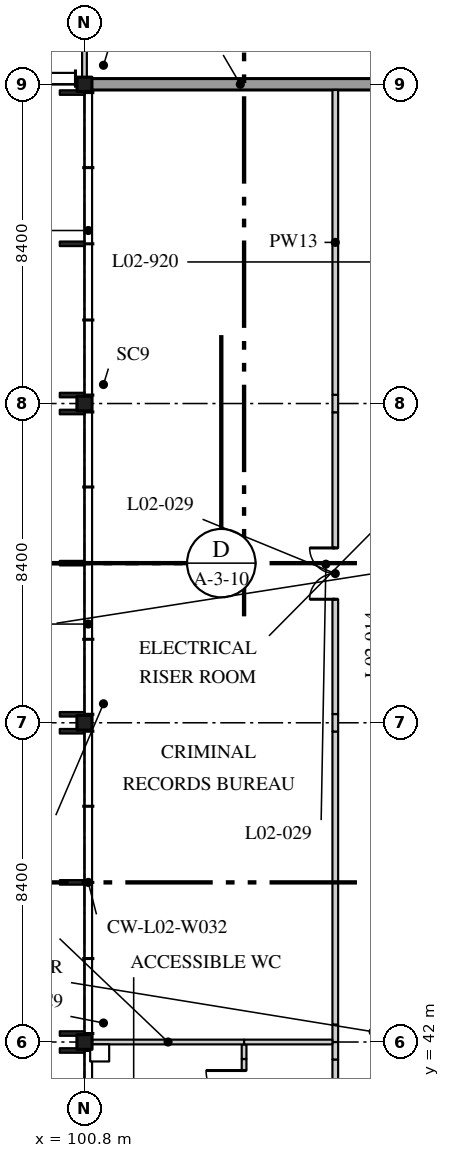
"""IFC4 building model, lengths in metres.
Left out: names, types, materials, properties, quantities, classifications, styles, units other than length and angle.
Written with IfcOpenShell. Run it as: python <this file> out.ifc"""

import sys

from ifc_helpers import new_model, si_unit, direction, frame, frame_2d, origin, origin_2d, place, context, subcontext, project, spatial, rectangle, i_section, extrude, element, fill, save


model = new_model("IFC4")
c1 = context("Model", 3, precision=1e-05, world=origin(), true_north=direction((0.0, 1.0)))
c2 = subcontext(c1, "Body", "Model", "MODEL_VIEW")
j1 = project(units=[si_unit("LENGTHUNIT", "METRE"), si_unit("PLANEANGLEUNIT", "RADIAN")], contexts=[c1])
p1 = place(None, origin())
s1 = spatial("IfcSite", under=j1, at=p1, CompositionType="ELEMENT")
p2 = place(p1, origin())
s2 = spatial("IfcBuilding", under=s1, at=p2, CompositionType="ELEMENT")
p3 = place(p2, frame((0.0, 0.0, 9.9)))
s3 = spatial("IfcBuildingStorey", under=s2, at=p3, CompositionType="ELEMENT", Elevation=9.9)
for number, where, z_axis, x_axis in (
    (1, (100.8, 42.0, 0.0), (0.0, 0.0, 1.0), (1.0, 0.0, 0.0)),
    (2, (100.8, 50.4, 0.0), (0.0, 0.0, 1.0), (1.0, 0.0, 0.0)),
    (3, (100.8, 58.8, 0.0), (0.0, 0.0, 1.0), (1.0, 0.0, 0.0)),
):
    element("IfcColumn", number, at=place(p3, frame(where, z_axis=z_axis, x_axis=x_axis)), inside=s3, PredefinedType="COLUMN", context=c2, shape_type="SweptSolid", body=[
        extrude(i_section(OverallWidth=0.399, OverallDepth=0.386, WebThickness=0.021, FlangeThickness=0.033, FilletRadius=0.015, at=origin_2d()), origin(), (0.0, 0.0, 1.0), 4.37),
    ])
p4 = place(p3, frame((100.8, 67.2, 0.0), z_axis=(0.0, 0.0, 1.0), x_axis=(1.0, 0.0, 0.0)))
e4 = element("IfcColumn", 4, at=p4, inside=s3, PredefinedType="COLUMN", context=c2, shape_type="SweptSolid", body=[
    extrude(i_section(OverallWidth=0.394, OverallDepth=0.376, WebThickness=0.017, FlangeThickness=0.028, FilletRadius=0.015, at=origin_2d()), origin(), (0.0, 0.0, 1.0), 4.37),
])
p5 = place(p3, frame((107.4, 33.75, 0.0), z_axis=(0.0, 0.0, 1.0), x_axis=(0.0, 1.0, 0.0)))
e5 = element("IfcWall", 5, at=p5, inside=s3, PredefinedType="PARTITIONING", context=c2, shape_type="SweptSolid", body=[
    extrude(rectangle(XDim=7.79, YDim=0.15, at=frame_2d((3.895, 0.0))), origin(), (0.0, 0.0, 1.0), 4.37),
])
p6 = place(p5, frame((2.4, 0.0, 0.0)))
e6 = element("IfcOpeningElement", 6, at=p6, cuts=e5, PredefinedType="OPENING", context=c2, shape_type="SweptSolid", body=[
    extrude(rectangle(XDim=0.9, YDim=2.1, at=frame_2d((0.45, 1.05))), frame((0.0, 0.085, 0.0), z_axis=(0.0, -1.0, 0.0), x_axis=(1.0, 0.0, 0.0)), (0.0, 0.0, 1.0), 0.17),
])
for number, where, z_axis, x_axis in (
    (7, (107.4, 41.54, 0.0), (0.0, 0.0, 1.0), (0.0, 1.0, 0.0)),
    (8, (107.4, 42.0, 0.0), (0.0, 0.0, 1.0), (0.0, 1.0, 0.0)),
):
    element("IfcWall", number, at=place(p3, frame(where, z_axis=z_axis, x_axis=x_axis)), inside=s3, PredefinedType="PARTITIONING", context=c2, shape_type="SweptSolid", body=[
        extrude(rectangle(XDim=0.46, YDim=0.15, at=frame_2d((0.23, 0.0))), origin(), (0.0, 0.0, 1.0), 3.746),
    ])
p7 = place(p3, frame((107.4, 42.46, 0.0), z_axis=(0.0, 0.0, 1.0), x_axis=(0.0, 1.0, 0.0)))
e9 = element("IfcWall", 9, at=p7, inside=s3, PredefinedType="PARTITIONING", context=c2, shape_type="SweptSolid", body=[
    extrude(rectangle(XDim=7.71, YDim=0.15, at=frame_2d((3.855, 0.0))), origin(), (0.0, 0.0, 1.0), 4.37),
])
p8 = place(p3, frame((107.4, 50.17, 0.0), z_axis=(0.0, 0.0, 1.0), x_axis=(0.0, 1.0, 0.0)))
e10 = element("IfcWall", 10, at=p8, inside=s3, PredefinedType="PARTITIONING", context=c2, shape_type="SweptSolid", body=[
    extrude(rectangle(XDim=0.46, YDim=0.15, at=frame_2d((0.23, 0.0))), origin(), (0.0, 0.0, 1.0), 3.746),
])
p9 = place(p3, frame((107.4, 50.63, 0.0), z_axis=(0.0, 0.0, 1.0), x_axis=(0.0, 1.0, 0.0)))
e11 = element("IfcWall", 11, at=p9, inside=s3, PredefinedType="PARTITIONING", context=c2, shape_type="SweptSolid", body=[
    extrude(rectangle(XDim=7.94, YDim=0.15, at=frame_2d((3.97, 0.0))), origin(), (0.0, 0.0, 1.0), 4.37),
])
p10 = place(p9, frame((3.02, 0.0, 0.0)))
e12 = element("IfcOpeningElement", 12, at=p10, cuts=e11, PredefinedType="OPENING", context=c2, shape_type="SweptSolid", body=[
    extrude(rectangle(XDim=1.35, YDim=2.1, at=frame_2d((0.675, 1.05))), frame((0.0, 0.085, 0.0), z_axis=(0.0, -1.0, 0.0), x_axis=(1.0, 0.0, 0.0)), (0.0, 0.0, 1.0), 0.17),
])
p11 = place(p3, frame((107.4, 58.57, 0.0), z_axis=(0.0, 0.0, 1.0), x_axis=(0.0, 1.0, 0.0)))
e13 = element("IfcWall", 13, at=p11, inside=s3, PredefinedType="PARTITIONING", context=c2, shape_type="SweptSolid", body=[
    extrude(rectangle(XDim=0.46, YDim=0.15, at=frame_2d((0.23, 0.0))), origin(), (0.0, 0.0, 1.0), 3.746),
])
p12 = place(p3, frame((107.4, 59.03, 0.0), z_axis=(0.0, 0.0, 1.0), x_axis=(0.0, 1.0, 0.0)))
e14 = element("IfcWall", 14, at=p12, inside=s3, PredefinedType="PARTITIONING", context=c2, shape_type="SweptSolid", body=[
    extrude(rectangle(XDim=8.02, YDim=0.15, at=frame_2d((4.01, 0.0))), origin(), (0.0, 0.0, 1.0), 4.37),
])
p13 = place(p3, frame((105.0, 39.6, 0.0), z_axis=(0.0, 0.0, 1.0), x_axis=(0.0, 1.0, 0.0)))
e15 = element("IfcWall", 15, at=p13, inside=s3, PredefinedType="PARTITIONING", context=c2, shape_type="SweptSolid", body=[
    extrude(rectangle(XDim=1.953, YDim=0.125, at=frame_2d((0.977, 0.0))), origin(), (0.0, 0.0, 1.0), 4.37),
])
p14 = place(p13, frame((0.65, 0.0, 0.0)))
e16 = element("IfcOpeningElement", 16, at=p14, cuts=e15, PredefinedType="OPENING", context=c2, shape_type="SweptSolid", body=[
    extrude(rectangle(XDim=1.0, YDim=2.1, at=frame_2d((0.5, 1.05))), frame((0.0, 0.073, 0.0), z_axis=(0.0, -1.0, 0.0), x_axis=(1.0, 0.0, 0.0)), (0.0, 0.0, 1.0), 0.145),
])
p15 = place(p3, frame((105.0, 41.553, 0.0), z_axis=(0.0, 0.0, 1.0), x_axis=(0.0, 1.0, 0.0)))
e17 = element("IfcWall", 17, at=p15, inside=s3, PredefinedType="PARTITIONING", context=c2, shape_type="SweptSolid", body=[
    extrude(rectangle(XDim=0.385, YDim=0.125, at=frame_2d((0.192, 0.0))), origin(), (0.0, 0.0, 1.0), 3.746),
])
p16 = place(p3, frame((100.999, 42.0, 0.0), z_axis=(0.0, 0.0, 1.0), x_axis=(1.0, 0.0, 0.0)))
e18 = element("IfcWall", 18, at=p16, inside=s3, PredefinedType="PARTITIONING", context=c2, shape_type="SweptSolid", body=[
    extrude(rectangle(XDim=4.001, YDim=0.125, at=frame_2d((2.0, 0.0))), origin(), (0.0, 0.0, 1.0), 3.746),
])
p17 = place(p3, frame((105.0, 42.0, 0.0), z_axis=(0.0, 0.0, 1.0), x_axis=(1.0, 0.0, 0.0)))
e19 = element("IfcWall", 19, at=p17, inside=s3, PredefinedType="PARTITIONING", context=c2, shape_type="SweptSolid", body=[
    extrude(rectangle(XDim=2.325, YDim=0.125, at=frame_2d((1.163, 0.0))), origin(), (0.0, 0.0, 1.0), 3.746),
])
p18 = place(p3, frame((100.8, 67.388, 0.0), z_axis=(0.0, 0.0, 1.0), x_axis=(0.0, 1.0, 0.0)))
e20 = element("IfcWall", 20, at=p18, inside=s3, PredefinedType="PARTITIONING", context=c2, shape_type="SweptSolid", body=[
    extrude(rectangle(XDim=6.637, YDim=0.125, at=frame_2d((3.318, 0.0))), origin(), (0.0, 0.0, 1.0), 3.746),
])
p19 = place(p3, frame((109.0, 67.2, 0.0), z_axis=(0.0, 0.0, 1.0), x_axis=(-1.0, 0.0, 0.0)))
e21 = element("IfcWall", 21, at=p19, inside=s3, PredefinedType="SOLIDWALL", context=c2, shape_type="SweptSolid", body=[
    extrude(rectangle(XDim=8.198, YDim=0.3, at=frame_2d((4.099, 0.0))), origin(), (0.0, 0.0, 1.0), 3.746),
])
p20 = place(p14, origin())
e22 = element("IfcDoor", 22, at=p20, inside=s3, OperationType="SINGLE_SWING_LEFT", PredefinedType="DOOR", context=c2, shape_type="SweptSolid", body=[
    extrude(rectangle(XDim=1.0, YDim=2.1, at=frame_2d((0.5, 1.05))), frame((0.0, 0.02, 0.0), z_axis=(0.0, -1.0, 0.0), x_axis=(1.0, 0.0, 0.0)), (0.0, 0.0, 1.0), 0.04),
])
fill(e16, e22)
p21 = place(p10, origin())
e23 = element("IfcDoor", 23, at=p21, inside=s3, OperationType="DOUBLE_DOOR_SINGLE_SWING", PredefinedType="DOOR", context=c2, shape_type="SweptSolid", body=[
    extrude(rectangle(XDim=1.35, YDim=2.1, at=frame_2d((0.675, 1.05))), frame((0.0, 0.025, 0.0), z_axis=(0.0, -1.0, 0.0), x_axis=(1.0, 0.0, 0.0)), (0.0, 0.0, 1.0), 0.05),
])
fill(e12, e23)
save(model, sys.argv[1])
